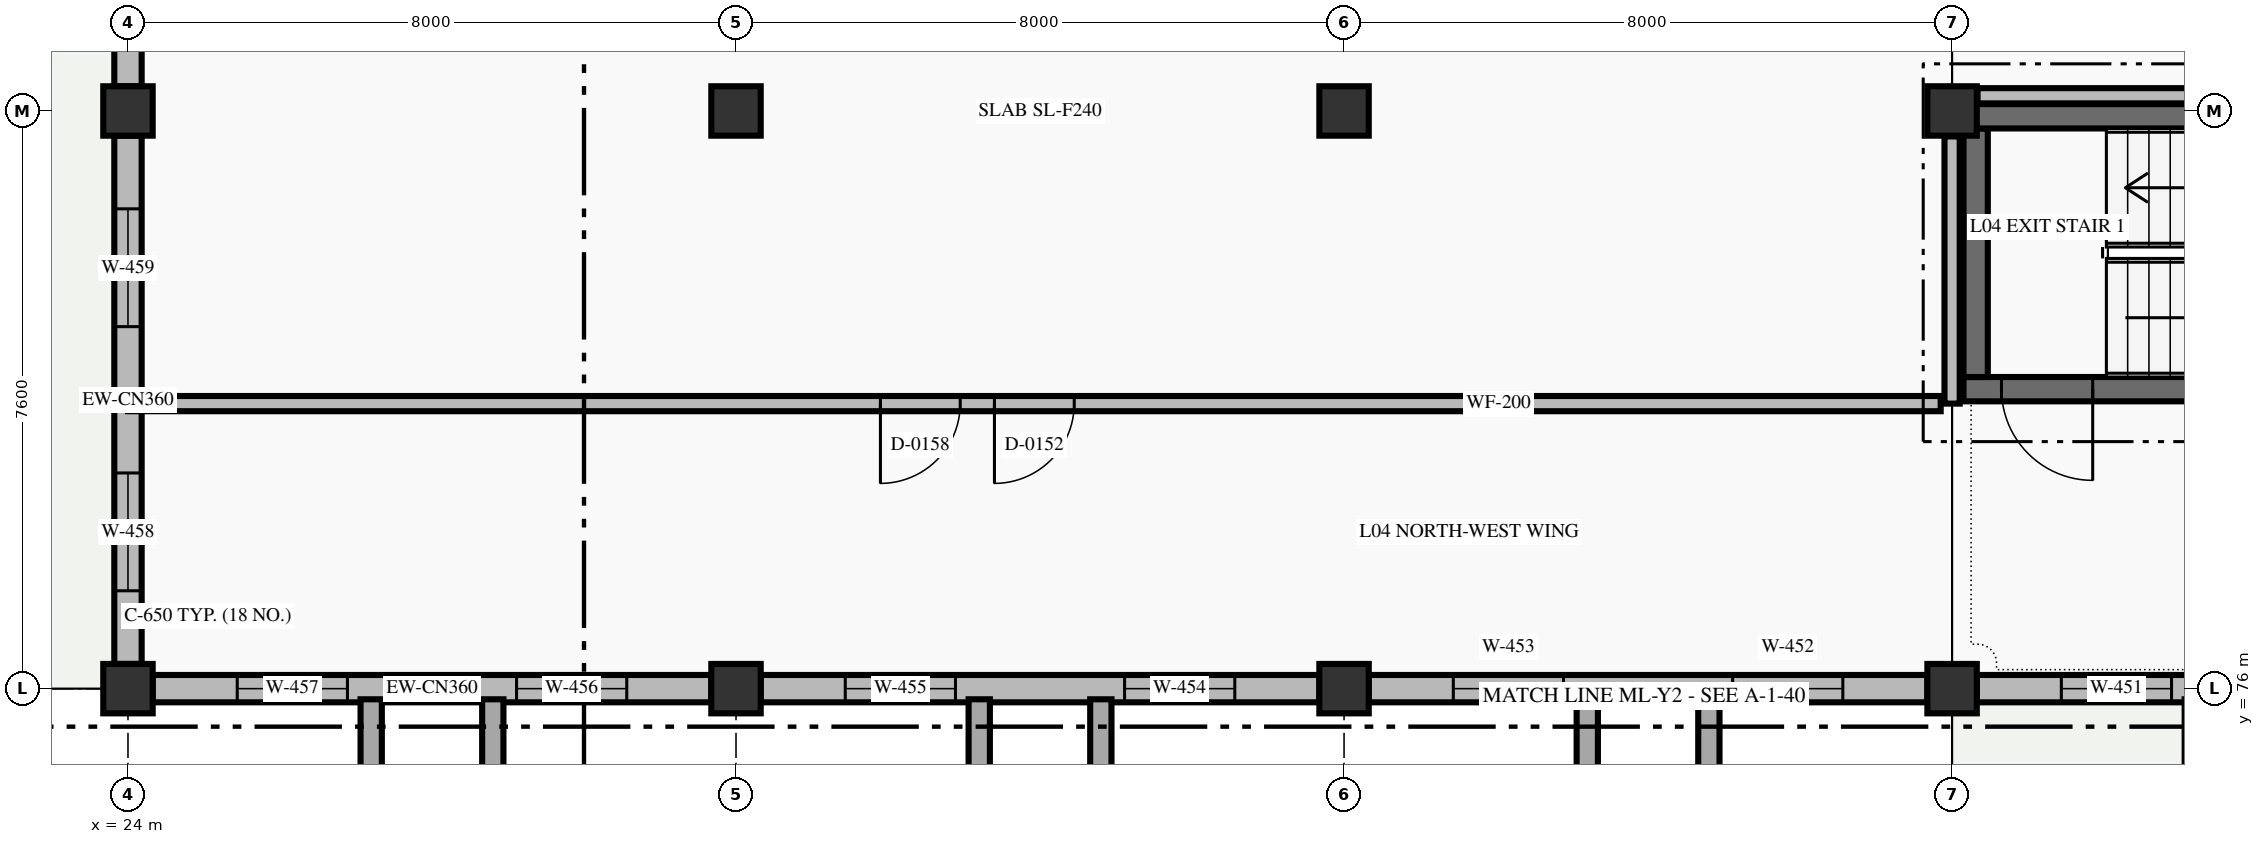
"""IFC4 building model, lengths in metres.
Left out: names, types, materials, properties, quantities, classifications, styles, units other than length and angle.
Written with IfcOpenShell. Run it as: python <this file> out.ifc"""

import sys

from ifc_helpers import new_model, si_unit, direction, frame, frame_2d, origin, origin_2d, place, context, subcontext, project, spatial, rectangle, extrude, element, fill, save


model = new_model("IFC4")
c1 = context("Model", 3, precision=1e-05, world=origin(), true_north=direction((0.0, 1.0)))
c2 = subcontext(c1, "Body", "Model", "MODEL_VIEW")
j1 = project(units=[si_unit("LENGTHUNIT", "METRE"), si_unit("PLANEANGLEUNIT", "RADIAN")], contexts=[c1])
p1 = place(None, origin())
s1 = spatial("IfcSite", under=j1, at=p1, CompositionType="ELEMENT")
p2 = place(p1, origin())
s2 = spatial("IfcBuilding", under=s1, at=p2, CompositionType="ELEMENT")
p3 = place(p2, frame((0.0, 0.0, 14.7)))
s3 = spatial("IfcBuildingStorey", under=s2, at=p3, CompositionType="ELEMENT", Elevation=14.7)
for number, where, z_axis, x_axis in (
    (1, (24.0, 76.0, 0.0), (0.0, 0.0, 1.0), (1.0, 0.0, 0.0)),
    (2, (24.0, 83.6, 0.0), (0.0, 0.0, 1.0), (1.0, 0.0, 0.0)),
    (3, (32.0, 76.0, 0.0), (0.0, 0.0, 1.0), (1.0, 0.0, 0.0)),
    (4, (32.0, 83.6, 0.0), (0.0, 0.0, 1.0), (1.0, 0.0, 0.0)),
    (5, (40.0, 76.0, 0.0), (0.0, 0.0, 1.0), (1.0, 0.0, 0.0)),
    (6, (40.0, 83.6, 0.0), (0.0, 0.0, 1.0), (1.0, 0.0, 0.0)),
    (7, (48.0, 76.0, 0.0), (0.0, 0.0, 1.0), (1.0, 0.0, 0.0)),
    (8, (48.0, 83.6, 0.0), (0.0, 0.0, 1.0), (1.0, 0.0, 0.0)),
):
    element("IfcColumn", number, at=place(p3, frame(where, z_axis=z_axis, x_axis=x_axis)), inside=s3, PredefinedType="COLUMN", context=c2, shape_type="SweptSolid", body=[
        extrude(rectangle(XDim=0.65, YDim=0.65, at=origin_2d()), origin(), (0.0, 0.0, 1.0), 4.2),
    ])
p4 = place(p3, frame((55.675, 76.0, 0.0), z_axis=(0.0, 0.0, 1.0), x_axis=(-1.0, 0.0, 0.0)))
e9 = element("IfcWall", 9, at=p4, inside=s3, PredefinedType="STANDARD", context=c2, shape_type="SweptSolid", body=[
    extrude(rectangle(XDim=7.35, YDim=0.36, at=frame_2d((3.675, 0.0))), origin(), (0.0, 0.0, 1.0), 3.17),
])
p5 = place(p4, frame((1.113, 0.0, 0.9)))
e10 = element("IfcOpeningElement", 10, at=p5, cuts=e9, PredefinedType="OPENING", context=c2, shape_type="SweptSolid", body=[
    extrude(rectangle(XDim=1.45, YDim=1.85, at=frame_2d((0.725, 0.925))), frame((0.0, 0.19, 0.0), z_axis=(0.0, -1.0, 0.0), x_axis=(1.0, 0.0, 0.0)), (0.0, 0.0, 1.0), 0.38),
])
p6 = place(p4, frame((4.788, 0.0, 0.9)))
e11 = element("IfcOpeningElement", 11, at=p6, cuts=e9, PredefinedType="OPENING", context=c2, shape_type="SweptSolid", body=[
    extrude(rectangle(XDim=1.45, YDim=1.85, at=frame_2d((0.725, 0.925))), frame((0.0, 0.19, 0.0), z_axis=(0.0, -1.0, 0.0), x_axis=(1.0, 0.0, 0.0)), (0.0, 0.0, 1.0), 0.38),
])
p7 = place(p3, frame((47.675, 76.0, 0.0), z_axis=(0.0, 0.0, 1.0), x_axis=(-1.0, 0.0, 0.0)))
e12 = element("IfcWall", 12, at=p7, inside=s3, PredefinedType="STANDARD", context=c2, shape_type="SweptSolid", body=[
    extrude(rectangle(XDim=7.35, YDim=0.36, at=frame_2d((3.675, 0.0))), origin(), (0.0, 0.0, 1.0), 3.17),
])
p8 = place(p7, frame((1.113, 0.0, 0.9)))
e13 = element("IfcOpeningElement", 13, at=p8, cuts=e12, PredefinedType="OPENING", context=c2, shape_type="SweptSolid", body=[
    extrude(rectangle(XDim=1.45, YDim=1.85, at=frame_2d((0.725, 0.925))), frame((0.0, 0.19, 0.0), z_axis=(0.0, -1.0, 0.0), x_axis=(1.0, 0.0, 0.0)), (0.0, 0.0, 1.0), 0.38),
])
p9 = place(p7, frame((4.788, 0.0, 0.9)))
e14 = element("IfcOpeningElement", 14, at=p9, cuts=e12, PredefinedType="OPENING", context=c2, shape_type="SweptSolid", body=[
    extrude(rectangle(XDim=1.45, YDim=1.85, at=frame_2d((0.725, 0.925))), frame((0.0, 0.19, 0.0), z_axis=(0.0, -1.0, 0.0), x_axis=(1.0, 0.0, 0.0)), (0.0, 0.0, 1.0), 0.38),
])
p10 = place(p3, frame((39.675, 76.0, 0.0), z_axis=(0.0, 0.0, 1.0), x_axis=(-1.0, 0.0, 0.0)))
e15 = element("IfcWall", 15, at=p10, inside=s3, PredefinedType="STANDARD", context=c2, shape_type="SweptSolid", body=[
    extrude(rectangle(XDim=7.35, YDim=0.36, at=frame_2d((3.675, 0.0))), origin(), (0.0, 0.0, 1.0), 3.17),
])
p11 = place(p10, frame((1.113, 0.0, 0.9)))
e16 = element("IfcOpeningElement", 16, at=p11, cuts=e15, PredefinedType="OPENING", context=c2, shape_type="SweptSolid", body=[
    extrude(rectangle(XDim=1.45, YDim=1.85, at=frame_2d((0.725, 0.925))), frame((0.0, 0.19, 0.0), z_axis=(0.0, -1.0, 0.0), x_axis=(1.0, 0.0, 0.0)), (0.0, 0.0, 1.0), 0.38),
])
p12 = place(p10, frame((4.788, 0.0, 0.9)))
e17 = element("IfcOpeningElement", 17, at=p12, cuts=e15, PredefinedType="OPENING", context=c2, shape_type="SweptSolid", body=[
    extrude(rectangle(XDim=1.45, YDim=1.85, at=frame_2d((0.725, 0.925))), frame((0.0, 0.19, 0.0), z_axis=(0.0, -1.0, 0.0), x_axis=(1.0, 0.0, 0.0)), (0.0, 0.0, 1.0), 0.38),
])
p13 = place(p3, frame((31.675, 76.0, 0.0), z_axis=(0.0, 0.0, 1.0), x_axis=(-1.0, 0.0, 0.0)))
e18 = element("IfcWall", 18, at=p13, inside=s3, PredefinedType="STANDARD", context=c2, shape_type="SweptSolid", body=[
    extrude(rectangle(XDim=7.35, YDim=0.36, at=frame_2d((3.675, 0.0))), origin(), (0.0, 0.0, 1.0), 3.17),
])
p14 = place(p13, frame((1.113, 0.0, 0.9)))
e19 = element("IfcOpeningElement", 19, at=p14, cuts=e18, PredefinedType="OPENING", context=c2, shape_type="SweptSolid", body=[
    extrude(rectangle(XDim=1.45, YDim=1.85, at=frame_2d((0.725, 0.925))), frame((0.0, 0.19, 0.0), z_axis=(0.0, -1.0, 0.0), x_axis=(1.0, 0.0, 0.0)), (0.0, 0.0, 1.0), 0.38),
])
p15 = place(p13, frame((4.788, 0.0, 0.9)))
e20 = element("IfcOpeningElement", 20, at=p15, cuts=e18, PredefinedType="OPENING", context=c2, shape_type="SweptSolid", body=[
    extrude(rectangle(XDim=1.45, YDim=1.85, at=frame_2d((0.725, 0.925))), frame((0.0, 0.19, 0.0), z_axis=(0.0, -1.0, 0.0), x_axis=(1.0, 0.0, 0.0)), (0.0, 0.0, 1.0), 0.38),
])
p16 = place(p3, frame((24.0, 76.325, 0.0), z_axis=(0.0, 0.0, 1.0), x_axis=(0.0, 1.0, 0.0)))
e21 = element("IfcWall", 21, at=p16, inside=s3, PredefinedType="STANDARD", context=c2, shape_type="SweptSolid", body=[
    extrude(rectangle(XDim=6.95, YDim=0.36, at=frame_2d((3.475, 0.0))), origin(), (0.0, 0.0, 1.0), 3.37),
])
p17 = place(p16, frame((0.962, 0.0, 0.9)))
e22 = element("IfcOpeningElement", 22, at=p17, cuts=e21, PredefinedType="OPENING", context=c2, shape_type="SweptSolid", body=[
    extrude(rectangle(XDim=1.55, YDim=1.95, at=frame_2d((0.775, 0.975))), frame((0.0, 0.19, 0.0), z_axis=(0.0, -1.0, 0.0), x_axis=(1.0, 0.0, 0.0)), (0.0, 0.0, 1.0), 0.38),
])
p18 = place(p16, frame((4.438, 0.0, 0.9)))
e23 = element("IfcOpeningElement", 23, at=p18, cuts=e21, PredefinedType="OPENING", context=c2, shape_type="SweptSolid", body=[
    extrude(rectangle(XDim=1.55, YDim=1.95, at=frame_2d((0.775, 0.975))), frame((0.0, 0.19, 0.0), z_axis=(0.0, -1.0, 0.0), x_axis=(1.0, 0.0, 0.0)), (0.0, 0.0, 1.0), 0.38),
])
p19 = place(p3, frame((24.0, 83.925, 0.0), z_axis=(0.0, 0.0, 1.0), x_axis=(0.0, 1.0, 0.0)))
e24 = element("IfcWall", 24, at=p19, inside=s3, PredefinedType="STANDARD", context=c2, shape_type="SweptSolid", body=[
    extrude(rectangle(XDim=6.95, YDim=0.36, at=frame_2d((3.475, 0.0))), origin(), (0.0, 0.0, 1.0), 3.37),
])
p20 = place(p19, frame((0.962, 0.0, 0.9)))
e25 = element("IfcOpeningElement", 25, at=p20, cuts=e24, PredefinedType="OPENING", context=c2, shape_type="SweptSolid", body=[
    extrude(rectangle(XDim=1.55, YDim=1.95, at=frame_2d((0.775, 0.975))), frame((0.0, 0.19, 0.0), z_axis=(0.0, -1.0, 0.0), x_axis=(1.0, 0.0, 0.0)), (0.0, 0.0, 1.0), 0.38),
])
p21 = place(p19, frame((4.438, 0.0, 0.9)))
e26 = element("IfcOpeningElement", 26, at=p21, cuts=e24, PredefinedType="OPENING", context=c2, shape_type="SweptSolid", body=[
    extrude(rectangle(XDim=1.55, YDim=1.95, at=frame_2d((0.775, 0.975))), frame((0.0, 0.19, 0.0), z_axis=(0.0, -1.0, 0.0), x_axis=(1.0, 0.0, 0.0)), (0.0, 0.0, 1.0), 0.38),
])
p22 = place(p3, frame((55.85, 79.94, 0.0), z_axis=(0.0, 0.0, 1.0), x_axis=(-1.0, 0.0, 0.0)))
e27 = element("IfcWall", 27, at=p22, inside=s3, PredefinedType="SHEAR", context=c2, shape_type="SweptSolid", body=[
    extrude(rectangle(XDim=7.7, YDim=0.32, at=frame_2d((3.85, 0.0))), origin(), (0.0, 0.0, 1.0), 4.2),
])
p23 = place(p22, frame((6.0, 0.0, 0.0)))
e28 = element("IfcOpeningElement", 28, at=p23, cuts=e27, PredefinedType="OPENING", context=c2, shape_type="SweptSolid", body=[
    extrude(rectangle(XDim=1.2, YDim=2.2, at=frame_2d((0.6, 1.1))), frame((0.0, 0.17, 0.0), z_axis=(0.0, -1.0, 0.0), x_axis=(1.0, 0.0, 0.0)), (0.0, 0.0, 1.0), 0.34),
])
p24 = place(p3, frame((48.31, 80.1, 0.0), z_axis=(0.0, 0.0, 1.0), x_axis=(0.0, 1.0, 0.0)))
e29 = element("IfcWall", 29, at=p24, inside=s3, PredefinedType="SHEAR", context=c2, shape_type="SweptSolid", body=[
    extrude(rectangle(XDim=3.27, YDim=0.32, at=frame_2d((1.635, 0.0))), origin(), (0.0, 0.0, 1.0), 4.2),
])
p25 = place(p3, frame((48.15, 83.53, 0.0), z_axis=(0.0, 0.0, 1.0), x_axis=(1.0, 0.0, 0.0)))
e30 = element("IfcWall", 30, at=p25, inside=s3, PredefinedType="SHEAR", context=c2, shape_type="SweptSolid", body=[
    extrude(rectangle(XDim=7.7, YDim=0.32, at=frame_2d((3.85, 0.0))), origin(), (0.0, 0.0, 1.0), 4.2),
])
p26 = place(p3, frame((48.0, 79.75, 0.0), z_axis=(0.0, 0.0, 1.0), x_axis=(0.0, 1.0, 0.0)))
e31 = element("IfcWall", 31, at=p26, inside=s3, PredefinedType="STANDARD", context=c2, shape_type="SweptSolid", body=[
    extrude(rectangle(XDim=3.515, YDim=0.2, at=frame_2d((1.757, 0.0))), origin(), (0.0, 0.0, 1.0), 3.37),
])
p27 = place(p3, frame((48.335, 83.8, 0.0), z_axis=(0.0, 0.0, 1.0), x_axis=(1.0, 0.0, 0.0)))
e32 = element("IfcWall", 32, at=p27, inside=s3, PredefinedType="STANDARD", context=c2, shape_type="SweptSolid", body=[
    extrude(rectangle(XDim=7.33, YDim=0.2, at=frame_2d((3.665, 0.0))), origin(), (0.0, 0.0, 1.0), 3.17),
])
p28 = place(p3, frame((47.85, 79.75, 0.0), z_axis=(0.0, 0.0, 1.0), x_axis=(-1.0, 0.0, 0.0)))
e33 = element("IfcWall", 33, at=p28, inside=s3, PredefinedType="STANDARD", context=c2, shape_type="SweptSolid", body=[
    extrude(rectangle(XDim=23.85, YDim=0.2, at=frame_2d((11.925, 0.0))), origin(), (0.0, 0.0, 1.0), 3.93),
])
p29 = place(p28, frame((11.4, 0.0, 0.0)))
e34 = element("IfcOpeningElement", 34, at=p29, cuts=e33, PredefinedType="OPENING", context=c2, shape_type="SweptSolid", body=[
    extrude(rectangle(XDim=1.05, YDim=2.15, at=frame_2d((0.525, 1.075))), frame((0.0, 0.11, 0.0), z_axis=(0.0, -1.0, 0.0), x_axis=(1.0, 0.0, 0.0)), (0.0, 0.0, 1.0), 0.22),
])
p30 = place(p28, frame((12.9, 0.0, 0.0)))
e35 = element("IfcOpeningElement", 35, at=p30, cuts=e33, PredefinedType="OPENING", context=c2, shape_type="SweptSolid", body=[
    extrude(rectangle(XDim=1.05, YDim=2.15, at=frame_2d((0.525, 1.075))), frame((0.0, 0.11, 0.0), z_axis=(0.0, -1.0, 0.0), x_axis=(1.0, 0.0, 0.0)), (0.0, 0.0, 1.0), 0.22),
])
p31 = place(p6, origin())
e36 = element("IfcWindow", 36, at=p31, inside=s3, PartitioningType="DOUBLE_PANEL_VERTICAL", PredefinedType="WINDOW", context=c2, shape_type="SweptSolid", body=[
    extrude(rectangle(XDim=1.45, YDim=1.85, at=frame_2d((0.725, 0.925))), frame((0.0, 0.03, 0.0), z_axis=(0.0, -1.0, 0.0), x_axis=(1.0, 0.0, 0.0)), (0.0, 0.0, 1.0), 0.06),
])
fill(e11, e36)
p32 = place(p8, origin())
e37 = element("IfcWindow", 37, at=p32, inside=s3, PartitioningType="DOUBLE_PANEL_VERTICAL", PredefinedType="WINDOW", context=c2, shape_type="SweptSolid", body=[
    extrude(rectangle(XDim=1.45, YDim=1.85, at=frame_2d((0.725, 0.925))), frame((0.0, 0.03, 0.0), z_axis=(0.0, -1.0, 0.0), x_axis=(1.0, 0.0, 0.0)), (0.0, 0.0, 1.0), 0.06),
])
fill(e13, e37)
p33 = place(p9, origin())
e38 = element("IfcWindow", 38, at=p33, inside=s3, PartitioningType="DOUBLE_PANEL_VERTICAL", PredefinedType="WINDOW", context=c2, shape_type="SweptSolid", body=[
    extrude(rectangle(XDim=1.45, YDim=1.85, at=frame_2d((0.725, 0.925))), frame((0.0, 0.03, 0.0), z_axis=(0.0, -1.0, 0.0), x_axis=(1.0, 0.0, 0.0)), (0.0, 0.0, 1.0), 0.06),
])
fill(e14, e38)
p34 = place(p11, origin())
e39 = element("IfcWindow", 39, at=p34, inside=s3, PartitioningType="DOUBLE_PANEL_VERTICAL", PredefinedType="WINDOW", context=c2, shape_type="SweptSolid", body=[
    extrude(rectangle(XDim=1.45, YDim=1.85, at=frame_2d((0.725, 0.925))), frame((0.0, 0.03, 0.0), z_axis=(0.0, -1.0, 0.0), x_axis=(1.0, 0.0, 0.0)), (0.0, 0.0, 1.0), 0.06),
])
fill(e16, e39)
p35 = place(p12, origin())
e40 = element("IfcWindow", 40, at=p35, inside=s3, PartitioningType="DOUBLE_PANEL_VERTICAL", PredefinedType="WINDOW", context=c2, shape_type="SweptSolid", body=[
    extrude(rectangle(XDim=1.45, YDim=1.85, at=frame_2d((0.725, 0.925))), frame((0.0, 0.03, 0.0), z_axis=(0.0, -1.0, 0.0), x_axis=(1.0, 0.0, 0.0)), (0.0, 0.0, 1.0), 0.06),
])
fill(e17, e40)
p36 = place(p14, origin())
e41 = element("IfcWindow", 41, at=p36, inside=s3, PartitioningType="DOUBLE_PANEL_VERTICAL", PredefinedType="WINDOW", context=c2, shape_type="SweptSolid", body=[
    extrude(rectangle(XDim=1.45, YDim=1.85, at=frame_2d((0.725, 0.925))), frame((0.0, 0.03, 0.0), z_axis=(0.0, -1.0, 0.0), x_axis=(1.0, 0.0, 0.0)), (0.0, 0.0, 1.0), 0.06),
])
fill(e19, e41)
p37 = place(p15, origin())
e42 = element("IfcWindow", 42, at=p37, inside=s3, PartitioningType="DOUBLE_PANEL_VERTICAL", PredefinedType="WINDOW", context=c2, shape_type="SweptSolid", body=[
    extrude(rectangle(XDim=1.45, YDim=1.85, at=frame_2d((0.725, 0.925))), frame((0.0, 0.03, 0.0), z_axis=(0.0, -1.0, 0.0), x_axis=(1.0, 0.0, 0.0)), (0.0, 0.0, 1.0), 0.06),
])
fill(e20, e42)
p38 = place(p17, origin())
e43 = element("IfcWindow", 43, at=p38, inside=s3, PartitioningType="DOUBLE_PANEL_VERTICAL", PredefinedType="WINDOW", context=c2, shape_type="SweptSolid", body=[
    extrude(rectangle(XDim=1.55, YDim=1.95, at=frame_2d((0.775, 0.975))), frame((0.0, 0.03, 0.0), z_axis=(0.0, -1.0, 0.0), x_axis=(1.0, 0.0, 0.0)), (0.0, 0.0, 1.0), 0.06),
])
fill(e22, e43)
p39 = place(p18, origin())
e44 = element("IfcWindow", 44, at=p39, inside=s3, PartitioningType="DOUBLE_PANEL_VERTICAL", PredefinedType="WINDOW", context=c2, shape_type="SweptSolid", body=[
    extrude(rectangle(XDim=1.55, YDim=1.95, at=frame_2d((0.775, 0.975))), frame((0.0, 0.03, 0.0), z_axis=(0.0, -1.0, 0.0), x_axis=(1.0, 0.0, 0.0)), (0.0, 0.0, 1.0), 0.06),
])
fill(e23, e44)
p40 = place(p23, origin())
e45 = element("IfcDoor", 45, at=p40, inside=s3, OperationType="SINGLE_SWING_LEFT", PredefinedType="DOOR", context=c2, shape_type="SweptSolid", body=[
    extrude(rectangle(XDim=1.2, YDim=2.2, at=frame_2d((0.6, 1.1))), frame((0.0, 0.025, 0.0), z_axis=(0.0, -1.0, 0.0), x_axis=(1.0, 0.0, 0.0)), (0.0, 0.0, 1.0), 0.05),
])
fill(e28, e45)
p41 = place(p29, origin())
e46 = element("IfcDoor", 46, at=p41, inside=s3, OperationType="SINGLE_SWING_RIGHT", PredefinedType="DOOR", context=c2, shape_type="SweptSolid", body=[
    extrude(rectangle(XDim=1.05, YDim=2.15, at=frame_2d((0.525, 1.075))), frame((0.0, 0.025, 0.0), z_axis=(0.0, -1.0, 0.0), x_axis=(1.0, 0.0, 0.0)), (0.0, 0.0, 1.0), 0.05),
])
fill(e34, e46)
p42 = place(p30, origin())
e47 = element("IfcDoor", 47, at=p42, inside=s3, OperationType="SINGLE_SWING_RIGHT", PredefinedType="DOOR", context=c2, shape_type="SweptSolid", body=[
    extrude(rectangle(XDim=1.05, YDim=2.15, at=frame_2d((0.525, 1.075))), frame((0.0, 0.025, 0.0), z_axis=(0.0, -1.0, 0.0), x_axis=(1.0, 0.0, 0.0)), (0.0, 0.0, 1.0), 0.05),
])
fill(e35, e47)
save(model, sys.argv[1])
